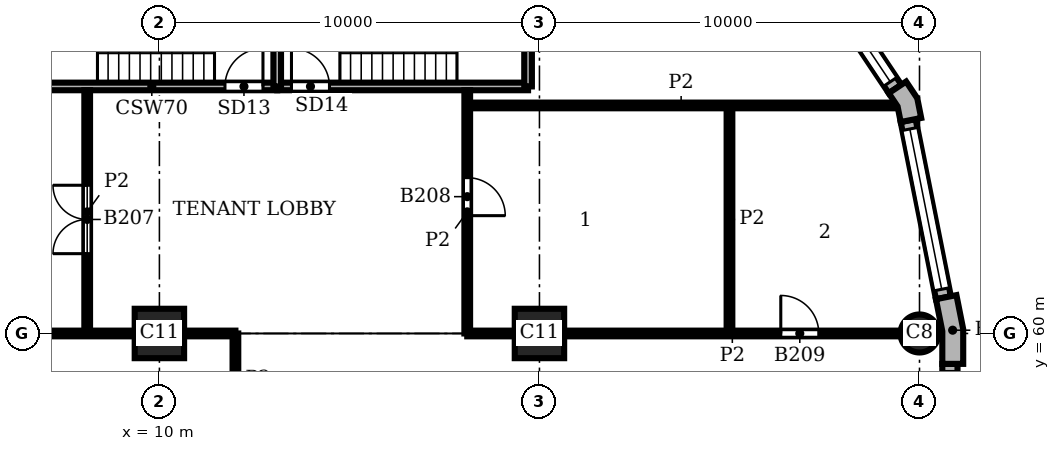
"""IFC4 building model, lengths in metres.
Left out: names, types, materials, properties, quantities, classifications, styles, units other than length and angle.
Written with IfcOpenShell. Run it as: python <this file> out.ifc"""

import sys

from ifc_helpers import new_model, si_unit, direction, frame, frame_2d, origin, origin_2d, place, context, subcontext, project, spatial, polyline, rectangle, circle, outline, extrude, element, fill, save


model = new_model("IFC4")
c1 = context("Model", 3, precision=1e-05, world=origin(), true_north=direction((0.0, 1.0)))
c2 = subcontext(c1, "Body", "Model", "MODEL_VIEW")
j1 = project(units=[si_unit("LENGTHUNIT", "METRE"), si_unit("PLANEANGLEUNIT", "RADIAN")], contexts=[c1])
p1 = place(None, origin())
s1 = spatial("IfcSite", under=j1, at=p1, CompositionType="ELEMENT")
p2 = place(p1, origin())
s2 = spatial("IfcBuilding", under=s1, at=p2, CompositionType="ELEMENT")
p3 = place(p2, frame((0.0, 0.0, 143.4)))
s3 = spatial("IfcBuildingStorey", under=s2, at=p3, CompositionType="ELEMENT", Elevation=143.4)
p4 = place(p3, frame((30.0, 60.0, 0.0), z_axis=(0.0, 0.0, 1.0), x_axis=(1.0, 0.0, 0.0)))
e1 = element("IfcColumn", 1, at=p4, inside=s3, PredefinedType="COLUMN", context=c2, shape_type="SweptSolid", body=[
    extrude(circle(Radius=0.5, at=origin_2d()), origin(), (0.0, 0.0, 1.0), 3.9),
])
for number, where, z_axis, x_axis in (
    (2, (10.0, 60.0, 0.0), (0.0, 0.0, 1.0), (1.0, 0.0, 0.0)),
    (3, (20.0, 60.0, 0.0), (0.0, 0.0, 1.0), (1.0, 0.0, 0.0)),
):
    element("IfcColumn", number, at=place(p3, frame(where, z_axis=z_axis, x_axis=x_axis)), inside=s3, PredefinedType="COLUMN", context=c2, shape_type="SweptSolid", body=[
        extrude(rectangle(XDim=1.3, YDim=1.3, at=origin_2d()), origin(), (0.0, 0.0, 1.0), 3.9),
    ])
p5 = place(p3, origin())
e4 = element("IfcWall", 4, at=p5, inside=s3, PredefinedType="SOLIDWALL", context=c2, shape_type="SweptSolid", body=[
    extrude(outline(polyline([(31.0, 59.2), (31.15, 59.2), (31.15, 60.113), (30.972, 61.009), (30.825, 60.98), (30.432, 60.902), (30.6, 60.059), (30.6, 59.2), (31.0, 59.2)])), origin(), (0.0, 0.0, 1.0), 3.9),
])
e5 = element("IfcWall", 5, at=p5, inside=s3, PredefinedType="SOLIDWALL", context=c2, shape_type="SweptSolid", body=[
    extrude(outline(polyline([(29.897, 65.641), (30.045, 65.67), (29.941, 66.189), (29.648, 66.629), (29.523, 66.545), (29.19, 66.323), (29.423, 65.974), (29.505, 65.563), (29.897, 65.641)])), origin(), (0.0, 0.0, 1.0), 3.9),
])
p6 = place(p3, frame((30.8, 40.8, 0.0), z_axis=(0.0, 0.0, 1.0), x_axis=(0.0, 1.0, 0.0)))
e6 = element("IfcWall", 6, at=p6, inside=s3, PredefinedType="SOLIDWALL", context=c2, shape_type="SweptSolid", body=[
    extrude(rectangle(XDim=18.4, YDim=0.4, at=frame_2d((9.2, 0.0))), origin(), (0.0, 0.0, 1.0), 3.9),
])
p7 = place(p6, frame((0.2, 0.0, 0.9)))
e7 = element("IfcOpeningElement", 7, at=p7, cuts=e6, PredefinedType="OPENING", context=c2, shape_type="SweptSolid", body=[
    extrude(rectangle(XDim=8.0, YDim=2.35, at=frame_2d((4.0, 1.175))), frame((0.0, 0.21, 0.0), z_axis=(0.0, -1.0, 0.0), x_axis=(1.0, 0.0, 0.0)), (0.0, 0.0, 1.0), 0.42),
])
p8 = place(p6, frame((10.2, 0.0, 0.9)))
e8 = element("IfcOpeningElement", 8, at=p8, cuts=e6, PredefinedType="OPENING", context=c2, shape_type="SweptSolid", body=[
    extrude(rectangle(XDim=8.0, YDim=2.35, at=frame_2d((4.0, 1.175))), frame((0.0, 0.21, 0.0), z_axis=(0.0, -1.0, 0.0), x_axis=(1.0, 0.0, 0.0)), (0.0, 0.0, 1.0), 0.42),
])
p9 = place(p3, frame((30.629, 60.941, 0.0), z_axis=(0.0, 0.0, 1.0), x_axis=(-0.195098533057, 0.98078364709, 0.0)))
e9 = element("IfcWall", 9, at=p9, inside=s3, PredefinedType="SOLIDWALL", context=c2, shape_type="SweptSolid", body=[
    extrude(rectangle(XDim=4.753, YDim=0.4, at=frame_2d((2.376, 0.0))), origin(), (0.0, 0.0, 1.0), 3.9),
])
p10 = place(p9, frame((0.226, 0.0, 0.9)))
e10 = element("IfcOpeningElement", 10, at=p10, cuts=e9, PredefinedType="OPENING", context=c2, shape_type="SweptSolid", body=[
    extrude(rectangle(XDim=4.3, YDim=2.35, at=frame_2d((2.15, 1.175))), frame((0.0, 0.21, 0.0), z_axis=(0.0, -1.0, 0.0), x_axis=(1.0, 0.0, 0.0)), (0.0, 0.0, 1.0), 0.42),
])
p11 = place(p3, frame((29.357, 66.434, 0.0), z_axis=(0.0, 0.0, 1.0), x_axis=(-0.555541552266, 0.831488775454, 0.0)))
e11 = element("IfcWall", 11, at=p11, inside=s3, PredefinedType="SOLIDWALL", context=c2, shape_type="SweptSolid", body=[
    extrude(rectangle(XDim=4.753, YDim=0.4, at=frame_2d((2.376, 0.0))), origin(), (0.0, 0.0, 1.0), 3.9),
])
p12 = place(p11, frame((0.226, 0.0, 0.9)))
e12 = element("IfcOpeningElement", 12, at=p12, cuts=e11, PredefinedType="OPENING", context=c2, shape_type="SweptSolid", body=[
    extrude(rectangle(XDim=4.3, YDim=2.35, at=frame_2d((2.15, 1.175))), frame((0.0, 0.21, 0.0), z_axis=(0.0, -1.0, 0.0), x_axis=(1.0, 0.0, 0.0)), (0.0, 0.0, 1.0), 0.42),
])
p13 = place(p3, frame((6.5, 66.5, 0.0), z_axis=(0.0, 0.0, 1.0), x_axis=(1.0, 0.0, 0.0)))
e13 = element("IfcWall", 13, at=p13, inside=s3, PredefinedType="SHEAR", context=c2, shape_type="SweptSolid", body=[
    extrude(rectangle(XDim=6.6, YDim=0.2, at=frame_2d((3.3, 0.0))), origin(), (0.0, 0.0, 1.0), 3.58),
])
p14 = place(p13, frame((5.225, 0.0, 0.0)))
e14 = element("IfcOpeningElement", 14, at=p14, cuts=e13, PredefinedType="OPENING", context=c2, shape_type="SweptSolid", body=[
    extrude(rectangle(XDim=1.0, YDim=2.1, at=frame_2d((0.5, 1.05))), frame((0.0, 0.11, 0.0), z_axis=(0.0, -1.0, 0.0), x_axis=(1.0, 0.0, 0.0)), (0.0, 0.0, 1.0), 0.22),
])
p15 = place(p3, frame((13.1, 66.5, 0.0), z_axis=(0.0, 0.0, 1.0), x_axis=(1.0, 0.0, 0.0)))
e15 = element("IfcWall", 15, at=p15, inside=s3, PredefinedType="SHEAR", context=c2, shape_type="SweptSolid", body=[
    extrude(rectangle(XDim=6.6, YDim=0.2, at=frame_2d((3.3, 0.0))), origin(), (0.0, 0.0, 1.0), 3.58),
])
p16 = place(p15, frame((0.375, 0.0, 0.0)))
e16 = element("IfcOpeningElement", 16, at=p16, cuts=e15, PredefinedType="OPENING", context=c2, shape_type="SweptSolid", body=[
    extrude(rectangle(XDim=1.0, YDim=2.1, at=frame_2d((0.5, 1.05))), frame((0.0, 0.11, 0.0), z_axis=(0.0, -1.0, 0.0), x_axis=(1.0, 0.0, 0.0)), (0.0, 0.0, 1.0), 0.22),
])
for number, where, z_axis, x_axis in (
    (17, (13.1, 66.5, 0.0), (0.0, 0.0, 1.0), (0.0, 1.0, 0.0)),
    (18, (19.7, 66.5, 0.0), (0.0, 0.0, 1.0), (0.0, 1.0, 0.0)),
):
    element("IfcWall", number, at=place(p3, frame(where, z_axis=z_axis, x_axis=x_axis)), inside=s3, PredefinedType="SHEAR", context=c2, shape_type="SweptSolid", body=[
        extrude(rectangle(XDim=3.3, YDim=0.2, at=frame_2d((1.65, 0.0))), origin(), (0.0, 0.0, 1.0), 3.58),
    ])
p17 = place(p3, frame((8.1, 60.0, 0.0), z_axis=(0.0, 0.0, 1.0), x_axis=(0.0, 1.0, 0.0)))
e19 = element("IfcWall", 19, at=p17, inside=s3, PredefinedType="PARTITIONING", context=c2, shape_type="SweptSolid", body=[
    extrude(rectangle(XDim=6.4, YDim=0.15, at=frame_2d((3.2, 0.0))), origin(), (0.0, 0.0, 1.0), 3.58),
])
p18 = place(p17, frame((2.1, 0.0, 0.0)))
e20 = element("IfcOpeningElement", 20, at=p18, cuts=e19, PredefinedType="OPENING", context=c2, shape_type="SweptSolid", body=[
    extrude(rectangle(XDim=1.8, YDim=2.1, at=frame_2d((0.9, 1.05))), frame((0.0, 0.085, 0.0), z_axis=(0.0, -1.0, 0.0), x_axis=(1.0, 0.0, 0.0)), (0.0, 0.0, 1.0), 0.17),
])
p19 = place(p3, frame((12.0, 57.6, 0.0), z_axis=(0.0, 0.0, 1.0), x_axis=(0.0, 1.0, 0.0)))
e21 = element("IfcWall", 21, at=p19, inside=s3, PredefinedType="PARTITIONING", context=c2, shape_type="SweptSolid", body=[
    extrude(rectangle(XDim=2.4, YDim=0.15, at=frame_2d((1.2, 0.0))), origin(), (0.0, 0.0, 1.0), 3.58),
])
p20 = place(p3, frame((18.1, 60.0, 0.0), z_axis=(0.0, 0.0, 1.0), x_axis=(0.0, 1.0, 0.0)))
e22 = element("IfcWall", 22, at=p20, inside=s3, PredefinedType="PARTITIONING", context=c2, shape_type="SweptSolid", body=[
    extrude(rectangle(XDim=6.4, YDim=0.15, at=frame_2d((3.2, 0.0))), origin(), (0.0, 0.0, 1.0), 3.58),
])
p21 = place(p20, frame((3.1, 0.0, 0.0)))
e23 = element("IfcOpeningElement", 23, at=p21, cuts=e22, PredefinedType="OPENING", context=c2, shape_type="SweptSolid", body=[
    extrude(rectangle(XDim=1.0, YDim=2.1, at=frame_2d((0.5, 1.05))), frame((0.0, 0.085, 0.0), z_axis=(0.0, -1.0, 0.0), x_axis=(1.0, 0.0, 0.0)), (0.0, 0.0, 1.0), 0.17),
])
p22 = place(p3, frame((25.0, 60.0, 0.0), z_axis=(0.0, 0.0, 1.0), x_axis=(0.0, 1.0, 0.0)))
e24 = element("IfcWall", 24, at=p22, inside=s3, PredefinedType="PARTITIONING", context=c2, shape_type="SweptSolid", body=[
    extrude(rectangle(XDim=6.0, YDim=0.15, at=frame_2d((3.0, 0.0))), origin(), (0.0, 0.0, 1.0), 3.58),
])
p23 = place(p3, frame((0.5, 60.0, 0.0), z_axis=(0.0, 0.0, 1.0), x_axis=(1.0, 0.0, 0.0)))
e25 = element("IfcWall", 25, at=p23, inside=s3, PredefinedType="PARTITIONING", context=c2, shape_type="SweptSolid", body=[
    extrude(rectangle(XDim=8.85, YDim=0.15, at=frame_2d((4.425, 0.0))), origin(), (0.0, 0.0, 1.0), 3.58),
])
p24 = place(p3, frame((10.65, 60.0, 0.0), z_axis=(0.0, 0.0, 1.0), x_axis=(1.0, 0.0, 0.0)))
e26 = element("IfcWall", 26, at=p24, inside=s3, PredefinedType="PARTITIONING", context=c2, shape_type="SweptSolid", body=[
    extrude(rectangle(XDim=1.35, YDim=0.15, at=frame_2d((0.675, 0.0))), origin(), (0.0, 0.0, 1.0), 3.58),
])
p25 = place(p3, frame((18.1, 60.0, 0.0), z_axis=(0.0, 0.0, 1.0), x_axis=(1.0, 0.0, 0.0)))
e27 = element("IfcWall", 27, at=p25, inside=s3, PredefinedType="PARTITIONING", context=c2, shape_type="SweptSolid", body=[
    extrude(rectangle(XDim=1.25, YDim=0.15, at=frame_2d((0.625, 0.0))), origin(), (0.0, 0.0, 1.0), 3.58),
])
p26 = place(p3, frame((20.65, 60.0, 0.0), z_axis=(0.0, 0.0, 1.0), x_axis=(1.0, 0.0, 0.0)))
e28 = element("IfcWall", 28, at=p26, inside=s3, PredefinedType="PARTITIONING", context=c2, shape_type="SweptSolid", body=[
    extrude(rectangle(XDim=8.85, YDim=0.15, at=frame_2d((4.425, 0.0))), origin(), (0.0, 0.0, 1.0), 3.58),
])
p27 = place(p26, frame((5.7, 0.0, 0.0)))
e29 = element("IfcOpeningElement", 29, at=p27, cuts=e28, PredefinedType="OPENING", context=c2, shape_type="SweptSolid", body=[
    extrude(rectangle(XDim=1.0, YDim=2.1, at=frame_2d((0.5, 1.05))), frame((0.0, 0.085, 0.0), z_axis=(0.0, -1.0, 0.0), x_axis=(1.0, 0.0, 0.0)), (0.0, 0.0, 1.0), 0.17),
])
p28 = place(p3, frame((18.1, 66.0, 0.0), z_axis=(0.0, 0.0, 1.0), x_axis=(1.0, 0.0, 0.0)))
e30 = element("IfcWall", 30, at=p28, inside=s3, PredefinedType="PARTITIONING", context=c2, shape_type="SweptSolid", body=[
    extrude(rectangle(XDim=11.256, YDim=0.15, at=frame_2d((5.628, 0.0))), origin(), (0.0, 0.0, 1.0), 3.58),
])
p29 = place(p10, origin())
e31 = element("IfcWindow", 31, at=p29, inside=s3, PartitioningType="SINGLE_PANEL", PredefinedType="WINDOW", context=c2, shape_type="SweptSolid", body=[
    extrude(rectangle(XDim=4.3, YDim=2.35, at=frame_2d((2.15, 1.175))), frame((0.0, 0.16, 0.0), z_axis=(0.0, -1.0, 0.0), x_axis=(1.0, 0.0, 0.0)), (0.0, 0.0, 1.0), 0.06),
])
fill(e10, e31)
p30 = place(p12, origin())
e32 = element("IfcWindow", 32, at=p30, inside=s3, PartitioningType="SINGLE_PANEL", PredefinedType="WINDOW", context=c2, shape_type="SweptSolid", body=[
    extrude(rectangle(XDim=4.3, YDim=2.35, at=frame_2d((2.15, 1.175))), frame((0.0, 0.16, 0.0), z_axis=(0.0, -1.0, 0.0), x_axis=(1.0, 0.0, 0.0)), (0.0, 0.0, 1.0), 0.06),
])
fill(e12, e32)
p31 = place(p14, origin())
e33 = element("IfcDoor", 33, at=p31, inside=s3, OperationType="SINGLE_SWING_RIGHT", PredefinedType="DOOR", context=c2, shape_type="SweptSolid", body=[
    extrude(rectangle(XDim=1.0, YDim=2.1, at=frame_2d((0.5, 1.05))), frame((0.0, 0.025, 0.0), z_axis=(0.0, -1.0, 0.0), x_axis=(1.0, 0.0, 0.0)), (0.0, 0.0, 1.0), 0.05),
])
fill(e14, e33)
p32 = place(p16, origin())
e34 = element("IfcDoor", 34, at=p32, inside=s3, OperationType="SINGLE_SWING_LEFT", PredefinedType="DOOR", context=c2, shape_type="SweptSolid", body=[
    extrude(rectangle(XDim=1.0, YDim=2.1, at=frame_2d((0.5, 1.05))), frame((0.0, 0.025, 0.0), z_axis=(0.0, -1.0, 0.0), x_axis=(1.0, 0.0, 0.0)), (0.0, 0.0, 1.0), 0.05),
])
fill(e16, e34)
p33 = place(p18, origin())
e35 = element("IfcDoor", 35, at=p33, inside=s3, OperationType="DOUBLE_DOOR_SINGLE_SWING", PredefinedType="DOOR", context=c2, shape_type="SweptSolid", body=[
    extrude(rectangle(XDim=1.8, YDim=2.1, at=frame_2d((0.9, 1.05))), frame((0.0, 0.025, 0.0), z_axis=(0.0, -1.0, 0.0), x_axis=(1.0, 0.0, 0.0)), (0.0, 0.0, 1.0), 0.05),
])
fill(e20, e35)
p34 = place(p21, frame((1.0, 0.0, 0.0), z_axis=(0.0, 0.0, 1.0), x_axis=(-1.0, 0.0, 0.0)))
e36 = element("IfcDoor", 36, at=p34, inside=s3, OperationType="SINGLE_SWING_RIGHT", PredefinedType="DOOR", context=c2, shape_type="SweptSolid", body=[
    extrude(rectangle(XDim=1.0, YDim=2.1, at=frame_2d((0.5, 1.05))), frame((0.0, 0.025, 0.0), z_axis=(0.0, -1.0, 0.0), x_axis=(1.0, 0.0, 0.0)), (0.0, 0.0, 1.0), 0.05),
])
fill(e23, e36)
p35 = place(p27, origin())
e37 = element("IfcDoor", 37, at=p35, inside=s3, OperationType="SINGLE_SWING_LEFT", PredefinedType="DOOR", context=c2, shape_type="SweptSolid", body=[
    extrude(rectangle(XDim=1.0, YDim=2.1, at=frame_2d((0.5, 1.05))), frame((0.0, 0.025, 0.0), z_axis=(0.0, -1.0, 0.0), x_axis=(1.0, 0.0, 0.0)), (0.0, 0.0, 1.0), 0.05),
])
fill(e29, e37)
save(model, sys.argv[1])
